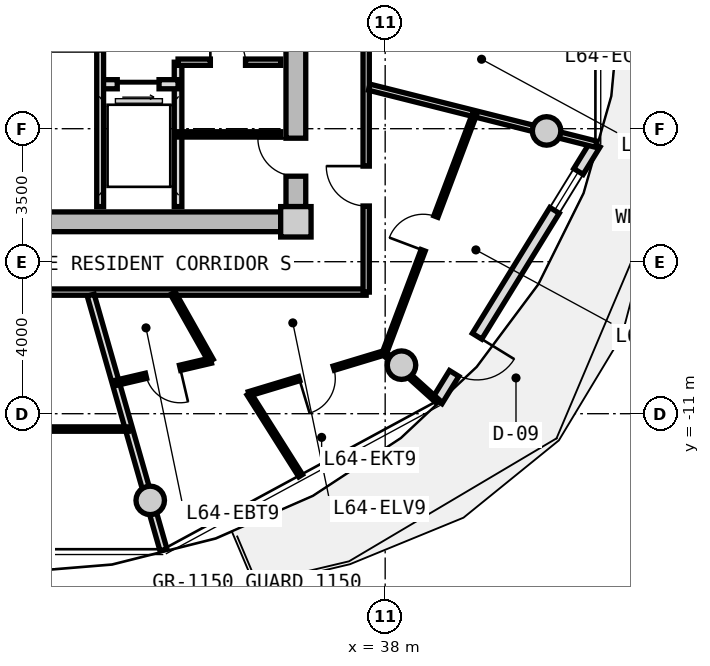
"""IFC4 building model, lengths in metres.
Left out: names, types, materials, properties, quantities, classifications, styles, units other than length and angle.
Written with IfcOpenShell. Run it as: python <this file> out.ifc"""

import sys

from ifc_helpers import new_model, si_unit, direction, frame, frame_2d, origin, origin_2d, place, context, subcontext, project, spatial, rectangle, circle, extrude, source, transform, mapped, element, fill, save


model = new_model("IFC4")
c1 = context("Model", 3, precision=1e-05, world=origin(), true_north=direction((0.0, 1.0)))
c2 = subcontext(c1, "Body", "Model", "MODEL_VIEW")
j1 = project(units=[si_unit("LENGTHUNIT", "METRE"), si_unit("PLANEANGLEUNIT", "RADIAN")], contexts=[c1])
p1 = place(None, origin())
s1 = spatial("IfcSite", under=j1, at=p1, CompositionType="ELEMENT")
p2 = place(p1, origin())
s2 = spatial("IfcBuilding", under=s1, at=p2, CompositionType="ELEMENT")
p3 = place(p2, frame((0.0, 0.0, 207.8)))
s3 = spatial("IfcBuildingStorey", under=s2, at=p3, CompositionType="ELEMENT", Elevation=207.8)
m1 = source(origin(), c2, "Body", "SweptSolid", [
    extrude(rectangle(XDim=0.8, YDim=0.8, at=origin_2d()), origin(), (0.0, 0.0, 1.0), 3.05),
])
p4 = place(p3, frame((35.65, -5.95, 0.0), z_axis=(0.0, 0.0, 1.0), x_axis=(1.0, 0.0, 0.0)))
e1 = element("IfcColumn", 1, at=p4, inside=s3, PredefinedType="COLUMN", context=c2, shape_type="MappedRepresentation", body=[
    mapped(m1, transform((0.0, 0.0, 0.0), x_axis=(1.0, 0.0, 0.0), y_axis=(0.0, 1.0, 0.0), z_axis=(0.0, 0.0, 1.0), scale=1.0)),
])
m2 = source(origin(), c2, "Body", "SweptSolid", [
    extrude(rectangle(XDim=14.5, YDim=0.52, at=frame_2d((7.25, 0.0))), origin(), (0.0, 0.0, 1.0), 2.76),
])
p5 = place(p3, frame((35.25, -5.95, 0.0), z_axis=(0.0, 0.0, 1.0), x_axis=(-1.0, 0.0, 0.0)))
e2 = element("IfcWall", 2, at=p5, inside=s3, PredefinedType="SHEAR", context=c2, shape_type="MappedRepresentation", body=[
    mapped(m2, transform((0.0, 0.0, 0.0), x_axis=(1.0, 0.0, 0.0), y_axis=(0.0, 1.0, 0.0), z_axis=(0.0, 0.0, 1.0), scale=1.0)),
])
m3 = source(origin(), c2, "Body", "SweptSolid", [
    extrude(rectangle(XDim=11.1, YDim=0.52, at=frame_2d((5.55, 0.0))), origin(), (0.0, 0.0, 1.0), 2.76),
])
p6 = place(p3, frame((35.65, 5.55, 0.0), z_axis=(0.0, 0.0, 1.0), x_axis=(0.0, -1.0, 0.0)))
e3 = element("IfcWall", 3, at=p6, inside=s3, PredefinedType="SHEAR", context=c2, shape_type="MappedRepresentation", body=[
    mapped(m3, transform((0.0, 0.0, 0.0), x_axis=(1.0, 0.0, 0.0), y_axis=(0.0, 1.0, 0.0), z_axis=(0.0, 0.0, 1.0), scale=1.0)),
])
p7 = place(p6, frame((5.65, 0.0, 0.0)))
e4 = element("IfcOpeningElement", 4, at=p7, cuts=e3, PredefinedType="OPENING", context=c2, shape_type="SweptSolid", body=[
    extrude(rectangle(XDim=1.2, YDim=2.15, at=frame_2d((0.6, 1.075))), frame((0.0, 0.27, 0.0), z_axis=(0.0, -1.0, 0.0), x_axis=(1.0, 0.0, 0.0)), (0.0, 0.0, 1.0), 0.54),
])
p8 = place(p6, frame((9.3, 0.0, 0.0)))
e5 = element("IfcOpeningElement", 5, at=p8, cuts=e3, PredefinedType="OPENING", context=c2, shape_type="SweptSolid", body=[
    extrude(rectangle(XDim=1.0, YDim=2.1, at=frame_2d((0.5, 1.05))), frame((0.0, 0.27, 0.0), z_axis=(0.0, -1.0, 0.0), x_axis=(1.0, 0.0, 0.0)), (0.0, 0.0, 1.0), 0.54),
])
m4 = source(origin(), c2, "Body", "SweptSolid", [
    extrude(circle(Radius=0.375, at=origin_2d()), origin(), (0.0, 0.0, 1.0), 3.05),
])
for number, where, z_axis, x_axis in (
    (6, (31.818, -13.281, 0.0), (0.0, 0.0, 1.0), (1.0, 0.0, 0.0)),
    (7, (38.43, -9.723, 0.0), (0.0, 0.0, 1.0), (1.0, 0.0, 0.0)),
    (8, (42.247, -3.559, 0.0), (0.0, 0.0, 1.0), (1.0, 0.0, 0.0)),
):
    element("IfcColumn", number, at=place(p3, frame(where, z_axis=z_axis, x_axis=x_axis)), inside=s3, PredefinedType="COLUMN", context=c2, shape_type="MappedRepresentation", body=[
        mapped(m4, transform((0.0, 0.0, 0.0), x_axis=(1.0, 0.0, 0.0), y_axis=(0.0, 1.0, 0.0), z_axis=(0.0, 0.0, 1.0), scale=1.0)),
    ])
m5 = source(origin(), c2, "Body", "SweptSolid", [
    extrude(rectangle(XDim=7.938, YDim=0.29, at=frame_2d((3.969, 0.0))), origin(), (0.0, 0.0, 1.0), 2.76),
])
p9 = place(p3, frame((43.532, -3.903, 0.0), z_axis=(0.0, 0.0, 1.0), x_axis=(-0.524244987663, -0.851567491694, 0.0)))
e9 = element("IfcWall", 9, at=p9, inside=s3, PredefinedType="SOLIDWALL", context=c2, shape_type="MappedRepresentation", body=[
    mapped(m5, transform((0.0, 0.0, 0.0), x_axis=(1.0, 0.0, 0.0), y_axis=(0.0, 1.0, 0.0), z_axis=(0.0, 0.0, 1.0), scale=1.0)),
])
p10 = place(p9, frame((5.94, 0.0, 0.0)))
e10 = element("IfcOpeningElement", 10, at=p10, cuts=e9, PredefinedType="OPENING", context=c2, shape_type="SweptSolid", body=[
    extrude(rectangle(XDim=1.15, YDim=2.25, at=frame_2d((0.575, 1.125))), frame((0.0, 0.155, 0.0), z_axis=(0.0, -1.0, 0.0), x_axis=(1.0, 0.0, 0.0)), (0.0, 0.0, 1.0), 0.31),
])
p11 = place(p9, frame((0.85, 0.0, 0.85)))
e11 = element("IfcOpeningElement", 11, at=p11, cuts=e9, PredefinedType="OPENING", context=c2, shape_type="SweptSolid", body=[
    extrude(rectangle(XDim=1.2, YDim=1.5, at=frame_2d((0.6, 0.75))), frame((0.0, 0.155, 0.0), z_axis=(0.0, -1.0, 0.0), x_axis=(1.0, 0.0, 0.0)), (0.0, 0.0, 1.0), 0.31),
])
m6 = source(origin(), c2, "Body", "SweptSolid", [
    extrude(rectangle(XDim=3.8, YDim=0.2, at=frame_2d((1.9, 0.0))), origin(), (0.0, 0.0, 1.0), 2.745),
])
p12 = place(p3, frame((32.55, -5.55, 0.0), z_axis=(0.0, 0.0, 1.0), x_axis=(0.0, 1.0, 0.0)))
e12 = element("IfcWall", 12, at=p12, inside=s3, PredefinedType="PARTITIONING", context=c2, shape_type="MappedRepresentation", body=[
    mapped(m6, transform((0.0, 0.0, 0.0), x_axis=(1.0, 0.0, 0.0), y_axis=(0.0, 1.0, 0.0), z_axis=(0.0, 0.0, 1.0), scale=1.0)),
])
m7 = source(origin(), c2, "Body", "SweptSolid", [
    extrude(rectangle(XDim=2.05, YDim=0.24, at=frame_2d((1.025, 0.0))), origin(), (0.0, 0.0, 1.0), 2.745),
])
p13 = place(p3, frame((30.5, -2.33, 0.0), z_axis=(0.0, 0.0, 1.0), x_axis=(1.0, 0.0, 0.0)))
e13 = element("IfcWall", 13, at=p13, inside=s3, PredefinedType="PARTITIONING", context=c2, shape_type="MappedRepresentation", body=[
    mapped(m7, transform((0.0, 0.0, 0.0), x_axis=(1.0, 0.0, 0.0), y_axis=(0.0, 1.0, 0.0), z_axis=(0.0, 0.0, 1.0), scale=1.0)),
])
p14 = place(p13, frame((0.45, 0.0, 0.0)))
e14 = element("IfcOpeningElement", 14, at=p14, cuts=e13, PredefinedType="OPENING", context=c2, shape_type="SweptSolid", body=[
    extrude(rectangle(XDim=1.1, YDim=2.2, at=frame_2d((0.55, 1.1))), frame((0.0, 0.13, 0.0), z_axis=(0.0, -1.0, 0.0), x_axis=(1.0, 0.0, 0.0)), (0.0, 0.0, 1.0), 0.26),
])
m8 = source(origin(), c2, "Body", "SweptSolid", [
    extrude(rectangle(XDim=4.2, YDim=0.18, at=frame_2d((2.1, 0.0))), origin(), (0.0, 0.0, 1.0), 2.745),
])
p15 = place(p3, frame((30.5, -5.55, 0.0), z_axis=(0.0, 0.0, 1.0), x_axis=(0.0, 1.0, 0.0)))
e15 = element("IfcWall", 15, at=p15, inside=s3, PredefinedType="PARTITIONING", context=c2, shape_type="MappedRepresentation", body=[
    mapped(m8, transform((0.0, 0.0, 0.0), x_axis=(1.0, 0.0, 0.0), y_axis=(0.0, 1.0, 0.0), z_axis=(0.0, 0.0, 1.0), scale=1.0)),
])
m9 = source(origin(), c2, "Body", "SweptSolid", [
    extrude(rectangle(XDim=2.7, YDim=0.165, at=frame_2d((1.35, 0.0))), origin(), (0.0, 0.0, 1.0), 2.745),
])
p16 = place(p3, frame((32.55, -1.75, 0.0), z_axis=(0.0, 0.0, 1.0), x_axis=(1.0, 0.0, 0.0)))
e16 = element("IfcWall", 16, at=p16, inside=s3, PredefinedType="PARTITIONING", context=c2, shape_type="MappedRepresentation", body=[
    mapped(m9, transform((0.0, 0.0, 0.0), x_axis=(1.0, 0.0, 0.0), y_axis=(0.0, 1.0, 0.0), z_axis=(0.0, 0.0, 1.0), scale=1.0)),
])
p17 = place(p16, frame((0.85, 0.0, 0.0)))
e17 = element("IfcOpeningElement", 17, at=p17, cuts=e16, PredefinedType="OPENING", context=c2, shape_type="SweptSolid", body=[
    extrude(rectangle(XDim=0.925, YDim=2.1, at=frame_2d((0.462, 1.05))), frame((0.0, 0.093, 0.0), z_axis=(0.0, -1.0, 0.0), x_axis=(1.0, 0.0, 0.0)), (0.0, 0.0, 1.0), 0.185),
])
m10 = source(origin(), c2, "Body", "SweptSolid", [
    extrude(rectangle(XDim=2.7, YDim=0.14, at=frame_2d((1.35, 0.0))), origin(), (0.0, 0.0, 1.0), 2.745),
])
p18 = place(p3, frame((32.55, -3.65, 0.0), z_axis=(0.0, 0.0, 1.0), x_axis=(1.0, 0.0, 0.0)))
e18 = element("IfcWall", 18, at=p18, inside=s3, PredefinedType="PARTITIONING", context=c2, shape_type="MappedRepresentation", body=[
    mapped(m10, transform((0.0, 0.0, 0.0), x_axis=(1.0, 0.0, 0.0), y_axis=(0.0, 1.0, 0.0), z_axis=(0.0, 0.0, 1.0), scale=1.0)),
])
m11 = source(origin(), c2, "Body", "SweptSolid", [
    extrude(rectangle(XDim=19.0, YDim=0.165, at=frame_2d((9.5, 0.0))), origin(), (0.0, 0.0, 1.0), 2.745),
])
p19 = place(p3, frame((37.5, -7.8, 0.0), z_axis=(0.0, 0.0, 1.0), x_axis=(-1.0, 0.0, 0.0)))
e19 = element("IfcWall", 19, at=p19, inside=s3, PredefinedType="PARTITIONING", context=c2, shape_type="MappedRepresentation", body=[
    mapped(m11, transform((0.0, 0.0, 0.0), x_axis=(1.0, 0.0, 0.0), y_axis=(0.0, 1.0, 0.0), z_axis=(0.0, 0.0, 1.0), scale=1.0)),
])
p20 = place(p19, frame((12.473, 0.0, 0.0)))
e20 = element("IfcOpeningElement", 20, at=p20, cuts=e19, PredefinedType="OPENING", context=c2, shape_type="SweptSolid", body=[
    extrude(rectangle(XDim=1.05, YDim=2.15, at=frame_2d((0.525, 1.075))), frame((0.0, 0.093, 0.0), z_axis=(0.0, -1.0, 0.0), x_axis=(1.0, 0.0, 0.0)), (0.0, 0.0, 1.0), 0.185),
])
m12 = source(origin(), c2, "Body", "SweptSolid", [
    extrude(rectangle(XDim=6.88, YDim=0.165, at=frame_2d((3.44, 0.0))), origin(), (0.0, 0.0, 1.0), 2.745),
])
p21 = place(p3, frame((37.5, -0.92, 0.0), z_axis=(0.0, 0.0, 1.0), x_axis=(0.0, -1.0, 0.0)))
e21 = element("IfcWall", 21, at=p21, inside=s3, PredefinedType="PARTITIONING", context=c2, shape_type="MappedRepresentation", body=[
    mapped(m12, transform((0.0, 0.0, 0.0), x_axis=(1.0, 0.0, 0.0), y_axis=(0.0, 1.0, 0.0), z_axis=(0.0, 0.0, 1.0), scale=1.0)),
])
p22 = place(p21, frame((3.564, 0.0, 0.0)))
e22 = element("IfcOpeningElement", 22, at=p22, cuts=e21, PredefinedType="OPENING", context=c2, shape_type="SweptSolid", body=[
    extrude(rectangle(XDim=1.05, YDim=2.15, at=frame_2d((0.525, 1.075))), frame((0.0, 0.093, 0.0), z_axis=(0.0, -1.0, 0.0), x_axis=(1.0, 0.0, 0.0)), (0.0, 0.0, 1.0), 0.185),
])
m13 = source(origin(), c2, "Body", "SweptSolid", [
    extrude(rectangle(XDim=6.157, YDim=0.165, at=frame_2d((3.079, 0.0))), origin(), (0.0, 0.0, 1.0), 2.385),
])
p23 = place(p3, frame((37.58, -2.407, 0.0), z_axis=(0.0, 0.0, 1.0), x_axis=(0.969840867184, -0.243738984038, 0.0)))
e23 = element("IfcWall", 23, at=p23, inside=s3, PredefinedType="PARTITIONING", context=c2, shape_type="MappedRepresentation", body=[
    mapped(m13, transform((0.0, 0.0, 0.0), x_axis=(1.0, 0.0, 0.0), y_axis=(0.0, 1.0, 0.0), z_axis=(0.0, 0.0, 1.0), scale=1.0)),
])
m14 = source(origin(), c2, "Body", "SweptSolid", [
    extrude(rectangle(XDim=6.974, YDim=0.19, at=frame_2d((3.487, 0.0))), origin(), (0.0, 0.0, 1.0), 2.345),
])
p24 = place(p3, frame((30.251, -7.88, 0.0), z_axis=(0.0, 0.0, 1.0), x_axis=(0.274707256801, -0.961527910703, 0.0)))
e24 = element("IfcWall", 24, at=p24, inside=s3, PredefinedType="PARTITIONING", context=c2, shape_type="MappedRepresentation", body=[
    mapped(m14, transform((0.0, 0.0, 0.0), x_axis=(1.0, 0.0, 0.0), y_axis=(0.0, 1.0, 0.0), z_axis=(0.0, 0.0, 1.0), scale=1.0)),
])
m15 = source(origin(), c2, "Body", "SweptSolid", [
    extrude(rectangle(XDim=6.481, YDim=0.115, at=frame_2d((3.24, 0.0))), origin(), (0.0, 0.0, 1.0), 2.745),
])
p25 = place(p3, frame((24.76, -11.404, 0.0), z_axis=(0.0, 0.0, 1.0), x_axis=(1.0, 0.0, 0.0)))
e25 = element("IfcWall", 25, at=p25, inside=s3, PredefinedType="PARTITIONING", context=c2, shape_type="MappedRepresentation", body=[
    mapped(m15, transform((0.0, 0.0, 0.0), x_axis=(1.0, 0.0, 0.0), y_axis=(0.0, 1.0, 0.0), z_axis=(0.0, 0.0, 1.0), scale=1.0)),
])
p26 = place(p25, frame((2.765, 0.0, 0.0)))
e26 = element("IfcOpeningElement", 26, at=p26, cuts=e25, PredefinedType="OPENING", context=c2, shape_type="SweptSolid", body=[
    extrude(rectangle(XDim=0.95, YDim=2.1, at=frame_2d((0.475, 1.05))), frame((0.0, 0.067, 0.0), z_axis=(0.0, -1.0, 0.0), x_axis=(1.0, 0.0, 0.0)), (0.0, 0.0, 1.0), 0.135),
])
m16 = source(origin(), c2, "Body", "SweptSolid", [
    extrude(rectangle(XDim=6.738, YDim=0.115, at=frame_2d((3.369, 0.0))), origin(), (0.0, 0.0, 1.0), 2.745),
])
p27 = place(p3, frame((37.978, -9.409, 0.0), z_axis=(0.0, 0.0, 1.0), x_axis=(0.352945344347, 0.935643940772, 0.0)))
e27 = element("IfcWall", 27, at=p27, inside=s3, PredefinedType="PARTITIONING", context=c2, shape_type="MappedRepresentation", body=[
    mapped(m16, transform((0.0, 0.0, 0.0), x_axis=(1.0, 0.0, 0.0), y_axis=(0.0, 1.0, 0.0), z_axis=(0.0, 0.0, 1.0), scale=1.0)),
])
p28 = place(p27, frame((2.894, 0.0, 0.0)))
e28 = element("IfcOpeningElement", 28, at=p28, cuts=e27, PredefinedType="OPENING", context=c2, shape_type="SweptSolid", body=[
    extrude(rectangle(XDim=0.95, YDim=2.1, at=frame_2d((0.475, 1.05))), frame((0.0, 0.067, 0.0), z_axis=(0.0, -1.0, 0.0), x_axis=(1.0, 0.0, 0.0)), (0.0, 0.0, 1.0), 0.135),
])
m17 = source(origin(), c2, "Body", "SweptSolid", [
    extrude(rectangle(XDim=1.894, YDim=0.115, at=frame_2d((0.947, 0.0))), origin(), (0.0, 0.0, 1.0), 2.345),
])
p29 = place(p3, frame((37.978, -9.409, 0.0), z_axis=(0.0, 0.0, 1.0), x_axis=(0.742704207382, -0.669619638554, 0.0)))
e29 = element("IfcWall", 29, at=p29, inside=s3, PredefinedType="PARTITIONING", context=c2, shape_type="MappedRepresentation", body=[
    mapped(m17, transform((0.0, 0.0, 0.0), x_axis=(1.0, 0.0, 0.0), y_axis=(0.0, 1.0, 0.0), z_axis=(0.0, 0.0, 1.0), scale=1.0)),
])
m18 = source(origin(), c2, "Body", "SweptSolid", [
    extrude(rectangle(XDim=2.035, YDim=0.14, at=frame_2d((1.018, 0.0))), origin(), (0.0, 0.0, 1.0), 2.745),
])
p30 = place(p3, frame((32.415, -7.83, 0.0), z_axis=(0.0, 0.0, 1.0), x_axis=(0.491092509169, -0.871107425888, 0.0)))
e30 = element("IfcWall", 30, at=p30, inside=s3, PredefinedType="PARTITIONING", context=c2, shape_type="MappedRepresentation", body=[
    mapped(m18, transform((0.0, 0.0, 0.0), x_axis=(1.0, 0.0, 0.0), y_axis=(0.0, 1.0, 0.0), z_axis=(0.0, 0.0, 1.0), scale=1.0)),
])
m19 = source(origin(), c2, "Body", "SweptSolid", [
    extrude(rectangle(XDim=2.586, YDim=0.14, at=frame_2d((1.293, 0.0))), origin(), (0.0, 0.0, 1.0), 2.745),
])
p31 = place(p3, frame((33.415, -9.603, 0.0), z_axis=(0.0, 0.0, 1.0), x_axis=(-0.973691298219, -0.227871138526, 0.0)))
e31 = element("IfcWall", 31, at=p31, inside=s3, PredefinedType="PARTITIONING", context=c2, shape_type="MappedRepresentation", body=[
    mapped(m19, transform((0.0, 0.0, 0.0), x_axis=(1.0, 0.0, 0.0), y_axis=(0.0, 1.0, 0.0), z_axis=(0.0, 0.0, 1.0), scale=1.0)),
])
p32 = place(p31, frame((0.833, 0.0, 0.0)))
e32 = element("IfcOpeningElement", 32, at=p32, cuts=e31, PredefinedType="OPENING", context=c2, shape_type="SweptSolid", body=[
    extrude(rectangle(XDim=0.92, YDim=2.1, at=frame_2d((0.46, 1.05))), frame((0.0, 0.08, 0.0), z_axis=(0.0, -1.0, 0.0), x_axis=(1.0, 0.0, 0.0)), (0.0, 0.0, 1.0), 0.16),
])
m20 = source(origin(), c2, "Body", "SweptSolid", [
    extrude(rectangle(XDim=2.549, YDim=0.115, at=frame_2d((1.274, 0.0))), origin(), (0.0, 0.0, 1.0), 2.745),
])
p33 = place(p3, frame((34.414, -10.477, 0.0), z_axis=(0.0, 0.0, 1.0), x_axis=(0.534108310175, -0.845416059111, 0.0)))
e33 = element("IfcWall", 33, at=p33, inside=s3, PredefinedType="PARTITIONING", context=c2, shape_type="MappedRepresentation", body=[
    mapped(m20, transform((0.0, 0.0, 0.0), x_axis=(1.0, 0.0, 0.0), y_axis=(0.0, 1.0, 0.0), z_axis=(0.0, 0.0, 1.0), scale=1.0)),
])
m21 = source(origin(), c2, "Body", "SweptSolid", [
    extrude(rectangle(XDim=3.714, YDim=0.115, at=frame_2d((1.857, 0.0))), origin(), (0.0, 0.0, 1.0), 2.745),
])
p34 = place(p3, frame((34.414, -10.477, 0.0), z_axis=(0.0, 0.0, 1.0), x_axis=(0.957188983281, 0.28946372879, 0.0)))
e34 = element("IfcWall", 34, at=p34, inside=s3, PredefinedType="PARTITIONING", context=c2, shape_type="MappedRepresentation", body=[
    mapped(m21, transform((0.0, 0.0, 0.0), x_axis=(1.0, 0.0, 0.0), y_axis=(0.0, 1.0, 0.0), z_axis=(0.0, 0.0, 1.0), scale=1.0)),
])
p35 = place(p34, frame((1.382, 0.0, 0.0)))
e35 = element("IfcOpeningElement", 35, at=p35, cuts=e34, PredefinedType="OPENING", context=c2, shape_type="SweptSolid", body=[
    extrude(rectangle(XDim=0.95, YDim=2.1, at=frame_2d((0.475, 1.05))), frame((0.0, 0.067, 0.0), z_axis=(0.0, -1.0, 0.0), x_axis=(1.0, 0.0, 0.0)), (0.0, 0.0, 1.0), 0.135),
])
m22 = source(origin(), c2, "Body", "SweptSolid", [
    extrude(rectangle(XDim=1.15, YDim=2.25, at=frame_2d((0.575, 1.125))), frame((0.0, 0.025, 0.0), z_axis=(0.0, -1.0, 0.0), x_axis=(1.0, 0.0, 0.0)), (0.0, 0.0, 1.0), 0.05),
])
p36 = place(p10, origin())
e36 = element("IfcDoor", 36, at=p36, inside=s3, OperationType="SINGLE_SWING_LEFT", PredefinedType="DOOR", context=c2, shape_type="MappedRepresentation", body=[
    mapped(m22, transform((0.0, 0.0, 0.0), x_axis=(1.0, 0.0, 0.0), y_axis=(0.0, 1.0, 0.0), z_axis=(0.0, 0.0, 1.0), scale=1.0)),
])
fill(e10, e36)
m23 = source(origin(), c2, "Body", "SweptSolid", [
    extrude(rectangle(XDim=1.2, YDim=1.5, at=frame_2d((0.6, 0.75))), frame((0.0, 0.03, 0.0), z_axis=(0.0, -1.0, 0.0), x_axis=(1.0, 0.0, 0.0)), (0.0, 0.0, 1.0), 0.06),
])
p37 = place(p11, origin())
e37 = element("IfcWindow", 37, at=p37, inside=s3, PartitioningType="SINGLE_PANEL", PredefinedType="WINDOW", context=c2, shape_type="MappedRepresentation", body=[
    mapped(m23, transform((0.0, 0.0, 0.0), x_axis=(1.0, 0.0, 0.0), y_axis=(0.0, 1.0, 0.0), z_axis=(0.0, 0.0, 1.0), scale=1.0)),
])
fill(e11, e37)
m24 = source(origin(), c2, "Body", "SweptSolid", [
    extrude(rectangle(XDim=1.1, YDim=2.2, at=frame_2d((0.55, 1.1))), frame((0.0, 0.025, 0.0), z_axis=(0.0, -1.0, 0.0), x_axis=(1.0, 0.0, 0.0)), (0.0, 0.0, 1.0), 0.05),
])
p38 = place(p14, frame((1.1, 0.0, 0.0), z_axis=(0.0, 0.0, 1.0), x_axis=(-1.0, 0.0, 0.0)))
e38 = element("IfcDoor", 38, at=p38, inside=s3, OperationType="SLIDING_TO_RIGHT", PredefinedType="DOOR", context=c2, shape_type="MappedRepresentation", body=[
    mapped(m24, transform((0.0, 0.0, 0.0), x_axis=(1.0, 0.0, 0.0), y_axis=(0.0, 1.0, 0.0), z_axis=(0.0, 0.0, 1.0), scale=1.0)),
])
fill(e14, e38)
m25 = source(origin(), c2, "Body", "SweptSolid", [
    extrude(rectangle(XDim=0.925, YDim=2.1, at=frame_2d((0.462, 1.05))), frame((0.0, 0.025, 0.0), z_axis=(0.0, -1.0, 0.0), x_axis=(1.0, 0.0, 0.0)), (0.0, 0.0, 1.0), 0.05),
])
p39 = place(p17, origin())
e39 = element("IfcDoor", 39, at=p39, inside=s3, OperationType="SINGLE_SWING_LEFT", PredefinedType="DOOR", context=c2, shape_type="MappedRepresentation", body=[
    mapped(m25, transform((0.0, 0.0, 0.0), x_axis=(1.0, 0.0, 0.0), y_axis=(0.0, 1.0, 0.0), z_axis=(0.0, 0.0, 1.0), scale=1.0)),
])
fill(e17, e39)
m26 = source(origin(), c2, "Body", "SweptSolid", [
    extrude(rectangle(XDim=1.0, YDim=2.1, at=frame_2d((0.5, 1.05))), frame((0.0, 0.025, 0.0), z_axis=(0.0, -1.0, 0.0), x_axis=(1.0, 0.0, 0.0)), (0.0, 0.0, 1.0), 0.05),
])
p40 = place(p8, frame((1.0, 0.0, 0.0), z_axis=(0.0, 0.0, 1.0), x_axis=(-1.0, 0.0, 0.0)))
e40 = element("IfcDoor", 40, at=p40, inside=s3, OperationType="SINGLE_SWING_RIGHT", PredefinedType="DOOR", context=c2, shape_type="MappedRepresentation", body=[
    mapped(m26, transform((0.0, 0.0, 0.0), x_axis=(1.0, 0.0, 0.0), y_axis=(0.0, 1.0, 0.0), z_axis=(0.0, 0.0, 1.0), scale=1.0)),
])
fill(e5, e40)
m27 = source(origin(), c2, "Body", "SweptSolid", [
    extrude(rectangle(XDim=1.05, YDim=2.15, at=frame_2d((0.525, 1.075))), frame((0.0, 0.025, 0.0), z_axis=(0.0, -1.0, 0.0), x_axis=(1.0, 0.0, 0.0)), (0.0, 0.0, 1.0), 0.05),
])
p41 = place(p22, frame((1.05, 0.0, 0.0), z_axis=(0.0, 0.0, 1.0), x_axis=(-1.0, 0.0, 0.0)))
e41 = element("IfcDoor", 41, at=p41, inside=s3, OperationType="SINGLE_SWING_RIGHT", PredefinedType="DOOR", context=c2, shape_type="MappedRepresentation", body=[
    mapped(m27, transform((0.0, 0.0, 0.0), x_axis=(1.0, 0.0, 0.0), y_axis=(0.0, 1.0, 0.0), z_axis=(0.0, 0.0, 1.0), scale=1.0)),
])
fill(e22, e41)
m28 = source(origin(), c2, "Body", "SweptSolid", [
    extrude(rectangle(XDim=0.92, YDim=2.1, at=frame_2d((0.46, 1.05))), frame((0.0, 0.025, 0.0), z_axis=(0.0, -1.0, 0.0), x_axis=(1.0, 0.0, 0.0)), (0.0, 0.0, 1.0), 0.05),
])
p42 = place(p32, origin())
e42 = element("IfcDoor", 42, at=p42, inside=s3, OperationType="SINGLE_SWING_LEFT", PredefinedType="DOOR", context=c2, shape_type="MappedRepresentation", body=[
    mapped(m28, transform((0.0, 0.0, 0.0), x_axis=(1.0, 0.0, 0.0), y_axis=(0.0, 1.0, 0.0), z_axis=(0.0, 0.0, 1.0), scale=1.0)),
])
fill(e32, e42)
m29 = source(origin(), c2, "Body", "SweptSolid", [
    extrude(rectangle(XDim=0.95, YDim=2.1, at=frame_2d((0.475, 1.05))), frame((0.0, 0.025, 0.0), z_axis=(0.0, -1.0, 0.0), x_axis=(1.0, 0.0, 0.0)), (0.0, 0.0, 1.0), 0.05),
])
p43 = place(p35, frame((0.95, 0.0, 0.0), z_axis=(0.0, 0.0, 1.0), x_axis=(-1.0, 0.0, 0.0)))
e43 = element("IfcDoor", 43, at=p43, inside=s3, OperationType="SINGLE_SWING_RIGHT", PredefinedType="DOOR", context=c2, shape_type="MappedRepresentation", body=[
    mapped(m29, transform((0.0, 0.0, 0.0), x_axis=(1.0, 0.0, 0.0), y_axis=(0.0, 1.0, 0.0), z_axis=(0.0, 0.0, 1.0), scale=1.0)),
])
fill(e35, e43)
p44 = place(p28, origin())
e44 = element("IfcDoor", 44, at=p44, inside=s3, OperationType="SINGLE_SWING_LEFT", PredefinedType="DOOR", context=c2, shape_type="MappedRepresentation", body=[
    mapped(m29, transform((0.0, 0.0, 0.0), x_axis=(1.0, 0.0, 0.0), y_axis=(0.0, 1.0, 0.0), z_axis=(0.0, 0.0, 1.0), scale=1.0)),
])
fill(e28, e44)
save(model, sys.argv[1])
